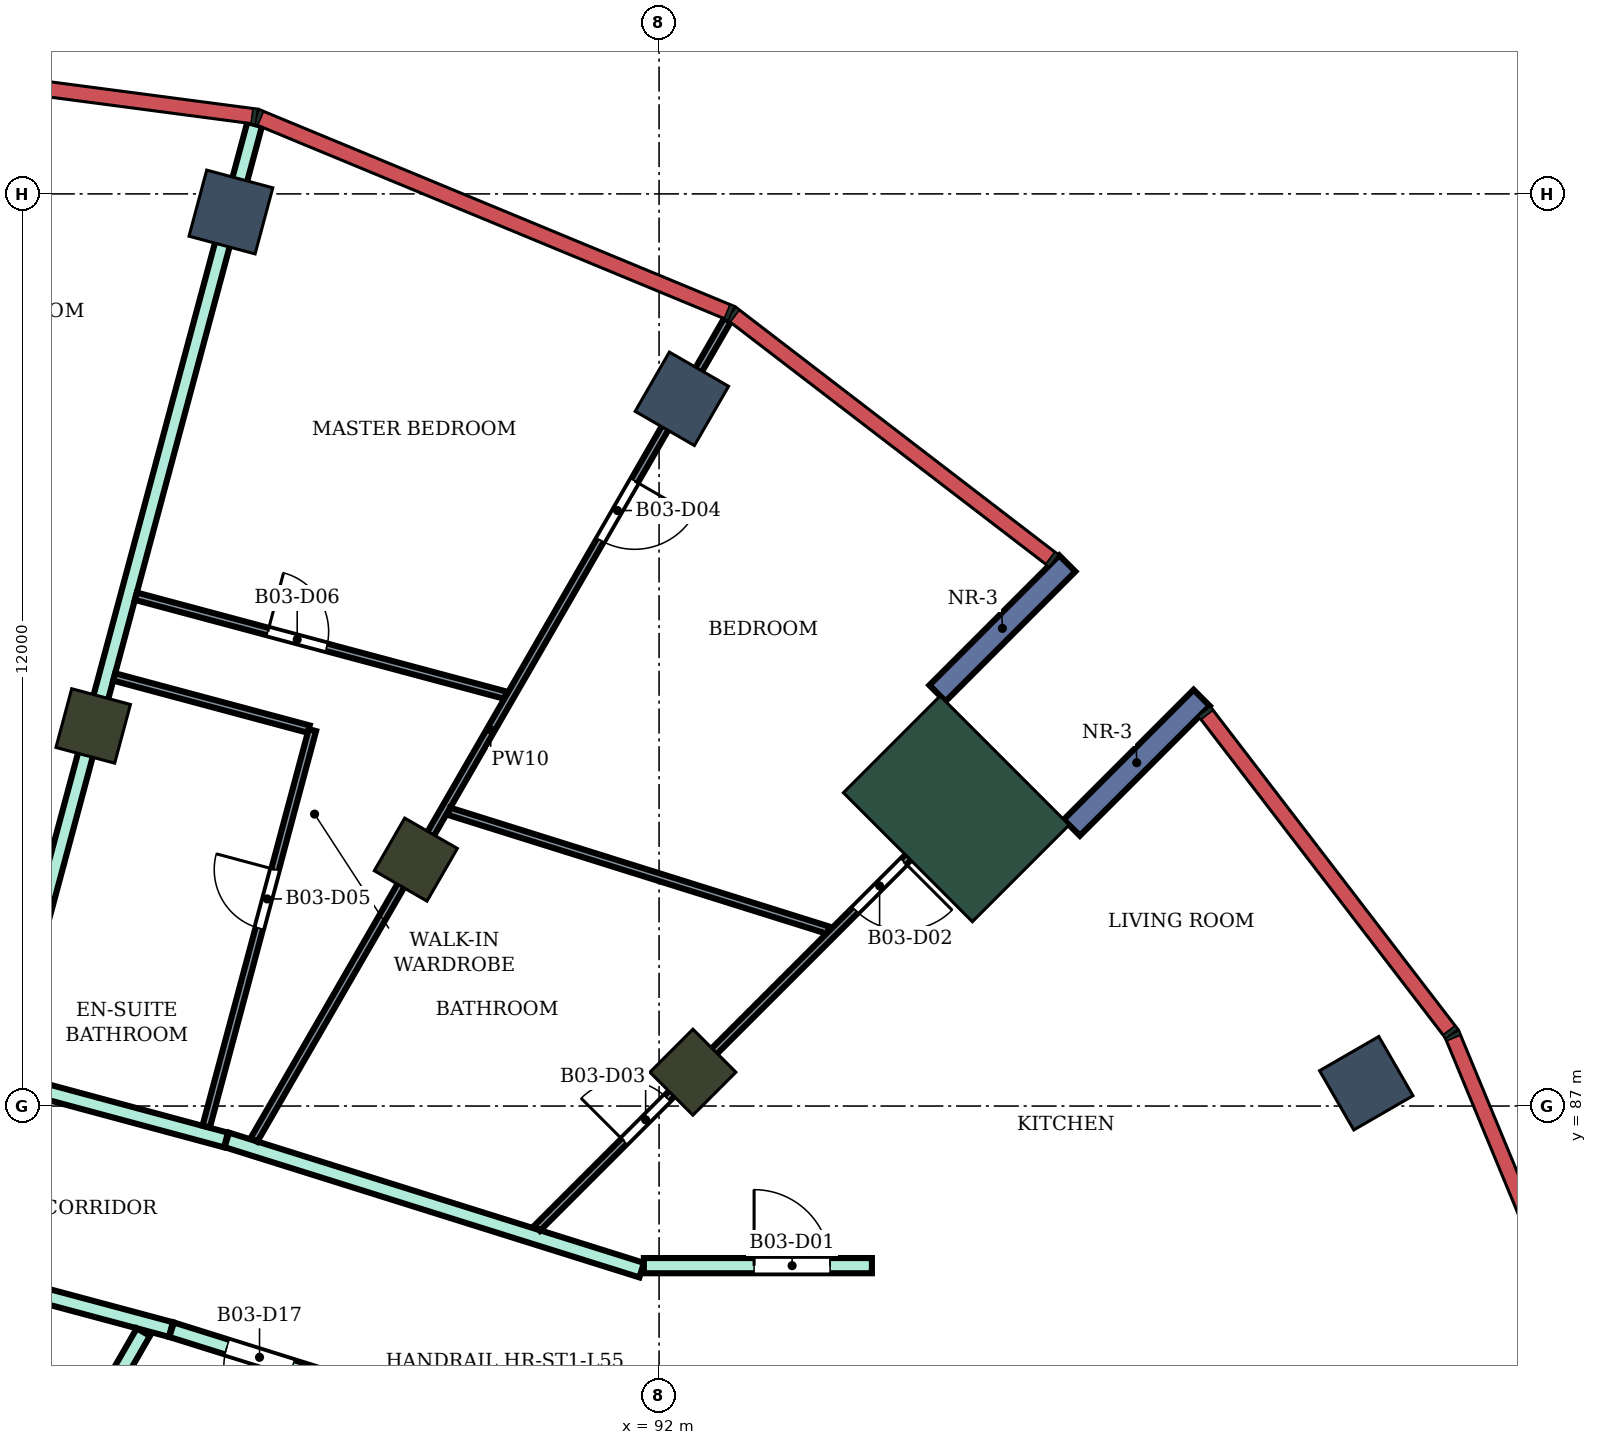
"""IFC4 building model, lengths in metres.
Left out: names, types, materials, properties, quantities, classifications, styles, units other than length and angle.
Written with IfcOpenShell. Run it as: python <this file> out.ifc"""

import sys

from ifc_helpers import new_model, si_unit, direction, frame, frame_2d, origin, origin_2d, place, context, subcontext, project, spatial, rectangle, extrude, element, fill, save


model = new_model("IFC4")
c1 = context("Model", 3, precision=1e-05, world=origin(), true_north=direction((0.0, 1.0)))
c2 = subcontext(c1, "Body", "Model", "MODEL_VIEW")
j1 = project(units=[si_unit("LENGTHUNIT", "METRE"), si_unit("PLANEANGLEUNIT", "RADIAN")], contexts=[c1])
p1 = place(None, origin())
s1 = spatial("IfcSite", under=j1, at=p1, CompositionType="ELEMENT")
p2 = place(p1, origin())
s2 = spatial("IfcBuilding", under=s1, at=p2, CompositionType="ELEMENT")
p3 = place(p2, frame((0.0, 0.0, 241.5)))
s3 = spatial("IfcBuildingStorey", under=s2, at=p3, CompositionType="ELEMENT", Elevation=241.5)
for number, where, z_axis, x_axis in (
    (1, (101.304, 87.3, 0.0), (0.0, 0.0, 1.0), (0.866, 0.5, 0.0)),
    (2, (92.3, 96.304, 0.0), (0.0, 0.0, 1.0), (0.5, 0.866, 0.0)),
    (3, (86.367, 98.762, 0.0), (0.0, 0.0, 1.0), (0.259, 0.966, 0.0)),
):
    element("IfcColumn", number, at=place(p3, frame(where, z_axis=z_axis, x_axis=x_axis)), inside=s3, PredefinedType="COLUMN", context=c2, shape_type="SweptSolid", body=[
        extrude(rectangle(XDim=0.9, YDim=0.9, at=origin_2d()), origin(), (0.0, 0.0, 1.0), 4.2),
    ])
for number, where, z_axis, x_axis in (
    (4, (92.445, 87.445, 0.0), (0.0, 0.0, 1.0), (0.707, 0.707, 0.0)),
    (5, (88.8, 90.242, 0.0), (0.0, 0.0, 1.0), (0.5, 0.866, 0.0)),
    (6, (84.555, 92.0, 0.0), (0.0, 0.0, 1.0), (0.259, 0.966, 0.0)),
):
    element("IfcColumn", number, at=place(p3, frame(where, z_axis=z_axis, x_axis=x_axis)), inside=s3, PredefinedType="COLUMN", context=c2, shape_type="SweptSolid", body=[
        extrude(rectangle(XDim=0.8, YDim=0.8, at=origin_2d()), origin(), (0.0, 0.0, 1.0), 4.2),
    ])
p4 = place(p3, frame((95.91, 90.91, 0.0), z_axis=(0.0, 0.0, 1.0), x_axis=(0.707106781187, 0.707106781187, 0.0)))
e7 = element("IfcColumn", 7, at=p4, inside=s3, PredefinedType="COLUMN", context=c2, shape_type="SweptSolid", body=[
    extrude(rectangle(XDim=1.8, YDim=2.4, at=origin_2d()), origin(), (0.0, 0.0, 1.0), 4.2),
])
for number, where, z_axis, x_axis in (
    (8, (97.43, 90.662, 0.0), (0.0, 0.0, 1.0), (0.707, 0.707, 0.0)),
    (9, (95.662, 92.43, 0.0), (0.0, 0.0, 1.0), (0.707, 0.707, 0.0)),
):
    element("IfcWall", number, at=place(p3, frame(where, z_axis=z_axis, x_axis=x_axis)), inside=s3, PredefinedType="NOTDEFINED", context=c2, shape_type="SweptSolid", body=[
        extrude(rectangle(XDim=2.416, YDim=0.3, at=frame_2d((1.208, 0.0))), origin(), (0.0, 0.0, 1.0), 4.2),
    ])
p5 = place(p3, frame((80.0, 85.554, 0.0), z_axis=(0.0, 0.0, 1.0), x_axis=(0.965928989968, -0.258807237802, 0.0)))
e10 = element("IfcWall", 10, at=p5, inside=s3, PredefinedType="PARTITIONING", context=c2, shape_type="SweptSolid", body=[
    extrude(rectangle(XDim=5.774, YDim=0.2, at=frame_2d((2.887, 0.0))), origin(), (0.0, 0.0, 1.0), 3.75),
])
p6 = place(p5, frame((2.292, 0.0, 0.0)))
e11 = element("IfcOpeningElement", 11, at=p6, cuts=e10, PredefinedType="OPENING", context=c2, shape_type="SweptSolid", body=[
    extrude(rectangle(XDim=0.9, YDim=2.1, at=frame_2d((0.45, 1.05))), frame((0.0, 0.11, 0.0), z_axis=(0.0, -1.0, 0.0), x_axis=(1.0, 0.0, 0.0)), (0.0, 0.0, 1.0), 0.22),
])
p7 = place(p3, frame((80.049, 88.237, 0.0), z_axis=(0.0, 0.0, 1.0), x_axis=(0.965582990495, -0.260095152718, 0.0)))
e12 = element("IfcWall", 12, at=p7, inside=s3, PredefinedType="PARTITIONING", context=c2, shape_type="SweptSolid", body=[
    extrude(rectangle(XDim=6.476, YDim=0.2, at=frame_2d((3.238, 0.0))), origin(), (0.0, 0.0, 1.0), 3.75),
])
p8 = place(p7, frame((0.5, 0.0, 0.0)))
e13 = element("IfcOpeningElement", 13, at=p8, cuts=e12, PredefinedType="OPENING", context=c2, shape_type="SweptSolid", body=[
    extrude(rectangle(XDim=1.0, YDim=2.1, at=frame_2d((0.5, 1.05))), frame((0.0, 0.11, 0.0), z_axis=(0.0, -1.0, 0.0), x_axis=(1.0, 0.0, 0.0)), (0.0, 0.0, 1.0), 0.22),
])
p9 = place(p3, frame((83.335, 87.456, 0.0), z_axis=(0.0, 0.0, 1.0), x_axis=(0.259184958139, 0.965827705895, 0.0)))
e14 = element("IfcWall", 14, at=p9, inside=s3, PredefinedType="PARTITIONING", context=c2, shape_type="SweptSolid", body=[
    extrude(rectangle(XDim=12.904, YDim=0.2, at=frame_2d((6.452, 0.0))), origin(), (0.0, 0.0, 1.0), 3.75),
])
p10 = place(p3, frame((83.852, 81.665, 0.0), z_axis=(0.0, 0.0, 1.0), x_axis=(0.500185068774, 0.865918527909, 0.0)))
e15 = element("IfcWall", 15, at=p10, inside=s3, PredefinedType="PARTITIONING", context=c2, shape_type="SweptSolid", body=[
    extrude(rectangle(XDim=2.726, YDim=0.2, at=frame_2d((1.363, 0.0))), origin(), (0.0, 0.0, 1.0), 3.75),
])
p11 = place(p3, frame((85.587, 84.057, 0.0), z_axis=(0.0, 0.0, 1.0), x_axis=(0.954239513179, -0.299043393987, 0.0)))
e16 = element("IfcWall", 16, at=p11, inside=s3, PredefinedType="PARTITIONING", context=c2, shape_type="SweptSolid", body=[
    extrude(rectangle(XDim=2.424, YDim=0.2, at=frame_2d((1.212, 0.0))), origin(), (0.0, 0.0, 1.0), 3.75),
])
p12 = place(p11, frame((0.762, 0.0, 0.0)))
e17 = element("IfcOpeningElement", 17, at=p12, cuts=e16, PredefinedType="OPENING", context=c2, shape_type="SweptSolid", body=[
    extrude(rectangle(XDim=0.9, YDim=2.1, at=frame_2d((0.45, 1.05))), frame((0.0, 0.11, 0.0), z_axis=(0.0, -1.0, 0.0), x_axis=(1.0, 0.0, 0.0)), (0.0, 0.0, 1.0), 0.22),
])
p13 = place(p3, frame((86.313, 86.554, 0.0), z_axis=(0.0, 0.0, 1.0), x_axis=(0.954081217458, -0.299548043717, 0.0)))
e18 = element("IfcWall", 18, at=p13, inside=s3, PredefinedType="PARTITIONING", context=c2, shape_type="SweptSolid", body=[
    extrude(rectangle(XDim=5.721, YDim=0.2, at=frame_2d((2.86, 0.0))), origin(), (0.0, 0.0, 1.0), 3.75),
])
p14 = place(p3, frame((91.8, 84.9, 0.0), z_axis=(0.0, 0.0, 1.0), x_axis=(1.0, 0.0, 0.0)))
e19 = element("IfcWall", 19, at=p14, inside=s3, PredefinedType="PARTITIONING", context=c2, shape_type="SweptSolid", body=[
    extrude(rectangle(XDim=3.0, YDim=0.2, at=frame_2d((1.5, 0.0))), origin(), (0.0, 0.0, 1.0), 3.75),
])
p15 = place(p14, frame((1.45, 0.0, 0.0)))
e20 = element("IfcOpeningElement", 20, at=p15, cuts=e19, PredefinedType="OPENING", context=c2, shape_type="SweptSolid", body=[
    extrude(rectangle(XDim=1.0, YDim=2.1, at=frame_2d((0.5, 1.05))), frame((0.0, 0.11, 0.0), z_axis=(0.0, -1.0, 0.0), x_axis=(1.0, 0.0, 0.0)), (0.0, 0.0, 1.0), 0.22),
])
p16 = place(p3, frame((84.831, 92.645, 0.0), z_axis=(0.0, 0.0, 1.0), x_axis=(0.965900745566, -0.258912629499, 0.0)))
e21 = element("IfcWall", 21, at=p16, inside=s3, PredefinedType="PARTITIONING", context=c2, shape_type="SweptSolid", body=[
    extrude(rectangle(XDim=2.65, YDim=0.1, at=frame_2d((1.325, 0.0))), origin(), (0.0, 0.0, 1.0), 3.75),
])
p17 = place(p3, frame((85.116, 93.707, 0.0), z_axis=(0.0, 0.0, 1.0), x_axis=(0.965979414561, -0.258618968068, 0.0)))
e22 = element("IfcWall", 22, at=p17, inside=s3, PredefinedType="PARTITIONING", context=c2, shape_type="SweptSolid", body=[
    extrude(rectangle(XDim=5.036, YDim=0.1, at=frame_2d((2.518, 0.0))), origin(), (0.0, 0.0, 1.0), 3.75),
])
p18 = place(p17, frame((1.798, 0.0, 0.0)))
e23 = element("IfcOpeningElement", 23, at=p18, cuts=e22, PredefinedType="OPENING", context=c2, shape_type="SweptSolid", body=[
    extrude(rectangle(XDim=0.8, YDim=2.1, at=frame_2d((0.4, 1.05))), frame((0.0, 0.06, 0.0), z_axis=(0.0, -1.0, 0.0), x_axis=(1.0, 0.0, 0.0)), (0.0, 0.0, 1.0), 0.12),
])
p19 = place(p3, frame((86.042, 86.731, 0.0), z_axis=(0.0, 0.0, 1.0), x_axis=(0.258737592043, 0.96594764789, 0.0)))
e24 = element("IfcWall", 24, at=p19, inside=s3, PredefinedType="PARTITIONING", context=c2, shape_type="SweptSolid", body=[
    extrude(rectangle(XDim=5.399, YDim=0.1, at=frame_2d((2.7, 0.0))), origin(), (0.0, 0.0, 1.0), 3.75),
])
p20 = place(p19, frame((2.7, 0.0, 0.0)))
e25 = element("IfcOpeningElement", 25, at=p20, cuts=e24, PredefinedType="OPENING", context=c2, shape_type="SweptSolid", body=[
    extrude(rectangle(XDim=0.8, YDim=2.1, at=frame_2d((0.4, 1.05))), frame((0.0, 0.06, 0.0), z_axis=(0.0, -1.0, 0.0), x_axis=(1.0, 0.0, 0.0)), (0.0, 0.0, 1.0), 0.12),
])
p21 = place(p3, frame((86.671, 86.554, 0.0), z_axis=(0.0, 0.0, 1.0), x_axis=(0.500104188531, 0.865965242151, 0.0)))
e26 = element("IfcWall", 26, at=p21, inside=s3, PredefinedType="PARTITIONING", context=c2, shape_type="SweptSolid", body=[
    extrude(rectangle(XDim=12.456, YDim=0.1, at=frame_2d((6.228, 0.0))), origin(), (0.0, 0.0, 1.0), 3.75),
])
p22 = place(p21, frame((9.111, 0.0, 0.0)))
e27 = element("IfcOpeningElement", 27, at=p22, cuts=e26, PredefinedType="OPENING", context=c2, shape_type="SweptSolid", body=[
    extrude(rectangle(XDim=0.9, YDim=2.1, at=frame_2d((0.45, 1.05))), frame((0.0, 0.06, 0.0), z_axis=(0.0, -1.0, 0.0), x_axis=(1.0, 0.0, 0.0)), (0.0, 0.0, 1.0), 0.12),
])
p23 = place(p3, frame((89.235, 90.878, 0.0), z_axis=(0.0, 0.0, 1.0), x_axis=(0.954193795587, -0.299189238548, 0.0)))
e28 = element("IfcWall", 28, at=p23, inside=s3, PredefinedType="PARTITIONING", context=c2, shape_type="SweptSolid", body=[
    extrude(rectangle(XDim=5.23, YDim=0.1, at=frame_2d((2.615, 0.0))), origin(), (0.0, 0.0, 1.0), 3.75),
])
p24 = place(p3, frame((90.396, 85.393, 0.0), z_axis=(0.0, 0.0, 1.0), x_axis=(0.707279106146, 0.706934414221, 0.0)))
e29 = element("IfcWall", 29, at=p24, inside=s3, PredefinedType="PARTITIONING", context=c2, shape_type="SweptSolid", body=[
    extrude(rectangle(XDim=8.5, YDim=0.1, at=frame_2d((4.25, 0.0))), origin(), (0.0, 0.0, 1.0), 3.75),
])
p25 = place(p24, frame((5.919, 0.0, 0.0)))
e30 = element("IfcOpeningElement", 30, at=p25, cuts=e29, PredefinedType="OPENING", context=c2, shape_type="SweptSolid", body=[
    extrude(rectangle(XDim=0.9, YDim=2.1, at=frame_2d((0.45, 1.05))), frame((0.0, 0.06, 0.0), z_axis=(0.0, -1.0, 0.0), x_axis=(1.0, 0.0, 0.0)), (0.0, 0.0, 1.0), 0.12),
])
p26 = place(p24, frame((1.617, 0.0, 0.0)))
e31 = element("IfcOpeningElement", 31, at=p26, cuts=e29, PredefinedType="OPENING", context=c2, shape_type="SweptSolid", body=[
    extrude(rectangle(XDim=0.8, YDim=2.1, at=frame_2d((0.4, 1.05))), frame((0.0, 0.06, 0.0), z_axis=(0.0, -1.0, 0.0), x_axis=(1.0, 0.0, 0.0)), (0.0, 0.0, 1.0), 0.12),
])
p27 = place(p15, origin())
e32 = element("IfcDoor", 32, at=p27, inside=s3, OperationType="SINGLE_SWING_LEFT", PredefinedType="DOOR", context=c2, shape_type="SweptSolid", body=[
    extrude(rectangle(XDim=1.0, YDim=2.1, at=frame_2d((0.5, 1.05))), frame((0.0, 0.025, 0.0), z_axis=(0.0, -1.0, 0.0), x_axis=(1.0, 0.0, 0.0)), (0.0, 0.0, 1.0), 0.05),
])
fill(e20, e32)
p28 = place(p25, frame((0.9, 0.0, 0.0), z_axis=(0.0, 0.0, 1.0), x_axis=(-1.0, 0.0, 0.0)))
e33 = element("IfcDoor", 33, at=p28, inside=s3, OperationType="SINGLE_SWING_LEFT", PredefinedType="DOOR", context=c2, shape_type="SweptSolid", body=[
    extrude(rectangle(XDim=0.9, YDim=2.1, at=frame_2d((0.45, 1.05))), frame((0.0, 0.025, 0.0), z_axis=(0.0, -1.0, 0.0), x_axis=(1.0, 0.0, 0.0)), (0.0, 0.0, 1.0), 0.05),
])
fill(e30, e33)
p29 = place(p26, origin())
e34 = element("IfcDoor", 34, at=p29, inside=s3, OperationType="SINGLE_SWING_LEFT", PredefinedType="DOOR", context=c2, shape_type="SweptSolid", body=[
    extrude(rectangle(XDim=0.8, YDim=2.1, at=frame_2d((0.4, 1.05))), frame((0.0, 0.025, 0.0), z_axis=(0.0, -1.0, 0.0), x_axis=(1.0, 0.0, 0.0)), (0.0, 0.0, 1.0), 0.05),
])
fill(e31, e34)
p30 = place(p22, frame((0.9, 0.0, 0.0), z_axis=(0.0, 0.0, 1.0), x_axis=(-1.0, 0.0, 0.0)))
e35 = element("IfcDoor", 35, at=p30, inside=s3, OperationType="SINGLE_SWING_LEFT", PredefinedType="DOOR", context=c2, shape_type="SweptSolid", body=[
    extrude(rectangle(XDim=0.9, YDim=2.1, at=frame_2d((0.45, 1.05))), frame((0.0, 0.025, 0.0), z_axis=(0.0, -1.0, 0.0), x_axis=(1.0, 0.0, 0.0)), (0.0, 0.0, 1.0), 0.05),
])
fill(e27, e35)
p31 = place(p20, origin())
e36 = element("IfcDoor", 36, at=p31, inside=s3, OperationType="SINGLE_SWING_RIGHT", PredefinedType="DOOR", context=c2, shape_type="SweptSolid", body=[
    extrude(rectangle(XDim=0.8, YDim=2.1, at=frame_2d((0.4, 1.05))), frame((0.0, 0.025, 0.0), z_axis=(0.0, -1.0, 0.0), x_axis=(1.0, 0.0, 0.0)), (0.0, 0.0, 1.0), 0.05),
])
fill(e25, e36)
p32 = place(p18, origin())
e37 = element("IfcDoor", 37, at=p32, inside=s3, OperationType="SINGLE_SWING_LEFT", PredefinedType="DOOR", context=c2, shape_type="SweptSolid", body=[
    extrude(rectangle(XDim=0.8, YDim=2.1, at=frame_2d((0.4, 1.05))), frame((0.0, 0.025, 0.0), z_axis=(0.0, -1.0, 0.0), x_axis=(1.0, 0.0, 0.0)), (0.0, 0.0, 1.0), 0.05),
])
fill(e23, e37)
p33 = place(p12, frame((0.9, 0.0, 0.0), z_axis=(0.0, 0.0, 1.0), x_axis=(-1.0, 0.0, 0.0)))
e38 = element("IfcDoor", 38, at=p33, inside=s3, OperationType="SINGLE_SWING_LEFT", PredefinedType="DOOR", context=c2, shape_type="SweptSolid", body=[
    extrude(rectangle(XDim=0.9, YDim=2.1, at=frame_2d((0.45, 1.05))), frame((0.0, 0.025, 0.0), z_axis=(0.0, -1.0, 0.0), x_axis=(1.0, 0.0, 0.0)), (0.0, 0.0, 1.0), 0.05),
])
fill(e17, e38)
save(model, sys.argv[1])
